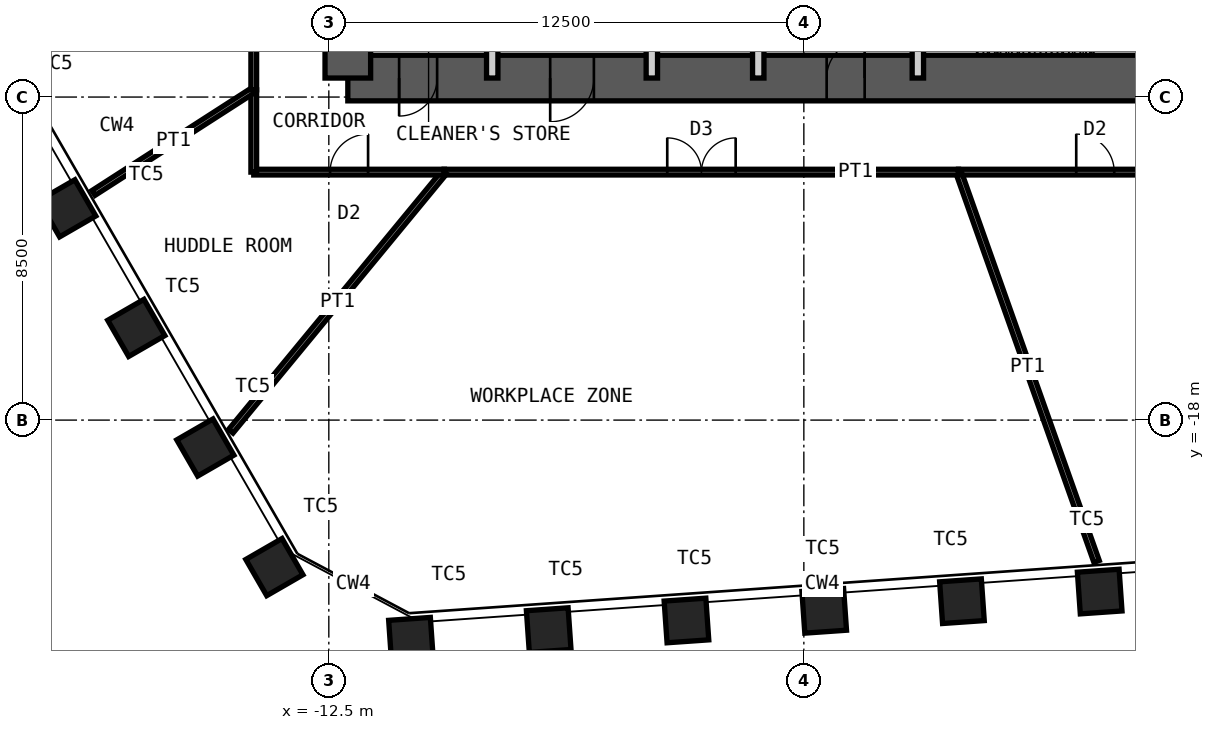
"""IFC4 building model, lengths in metres.
Left out: names, types, materials, properties, quantities, classifications, styles, units other than length and angle.
Written with IfcOpenShell. Run it as: python <this file> out.ifc"""

import sys

from ifc_helpers import new_model, si_unit, direction, frame, frame_2d, origin, origin_2d, place, context, subcontext, project, spatial, rectangle, hollow_rectangle, extrude, element, fill, save


model = new_model("IFC4")
c1 = context("Model", 3, precision=1e-05, world=origin(), true_north=direction((0.0, 1.0)))
c2 = subcontext(c1, "Body", "Model", "MODEL_VIEW")
j1 = project(units=[si_unit("LENGTHUNIT", "METRE"), si_unit("PLANEANGLEUNIT", "RADIAN")], contexts=[c1])
p1 = place(None, origin())
s1 = spatial("IfcSite", under=j1, at=p1, CompositionType="ELEMENT")
p2 = place(p1, origin())
s2 = spatial("IfcBuilding", under=s1, at=p2, CompositionType="ELEMENT")
p3 = place(p2, frame((0.0, 0.0, 184.6)))
s3 = spatial("IfcBuildingStorey", under=s2, at=p3, CompositionType="ELEMENT", Elevation=184.6)
for number, where, z_axis, x_axis in (
    (1, (7.785, -22.512, 0.0), (0.0, 0.0, 1.0), (0.998, 0.07, 0.0)),
    (2, (4.16, -22.765, 0.0), (0.0, 0.0, 1.0), (0.998, 0.07, 0.0)),
    (3, (0.536, -23.019, 0.0), (0.0, 0.0, 1.0), (0.998, 0.07, 0.0)),
    (4, (-3.089, -23.272, 0.0), (0.0, 0.0, 1.0), (0.998, 0.07, 0.0)),
    (5, (-6.714, -23.526, 0.0), (0.0, 0.0, 1.0), (0.998, 0.07, 0.0)),
    (6, (-10.338, -23.779, 0.0), (0.0, 0.0, 1.0), (0.998, 0.07, 0.0)),
    (7, (-13.933, -21.868, 0.0), (0.0, 0.0, 1.0), (0.5, -0.866, 0.0)),
    (8, (-15.749, -18.721, 0.0), (0.0, 0.0, 1.0), (0.5, -0.866, 0.0)),
    (9, (-17.566, -15.574, 0.0), (0.0, 0.0, 1.0), (0.5, -0.866, 0.0)),
    (10, (-19.383, -12.428, 0.0), (0.0, 0.0, 1.0), (0.5, -0.866, 0.0)),
):
    element("IfcColumn", number, at=place(p3, frame(where, z_axis=z_axis, x_axis=x_axis)), inside=s3, PredefinedType="COLUMN", context=c2, shape_type="SweptSolid", body=[
        extrude(hollow_rectangle(XDim=1.1, YDim=1.1, WallThickness=0.07, at=origin_2d()), origin(), (0.0, 0.0, 1.0), 4.2),
    ])
p4 = place(p3, frame((-12.0, -9.0, 0.0), z_axis=(0.0, 0.0, 1.0), x_axis=(1.0, 0.0, 0.0)))
e11 = element("IfcWall", 11, at=p4, inside=s3, PredefinedType="SHEAR", context=c2, shape_type="SweptSolid", body=[
    extrude(rectangle(XDim=24.0, YDim=1.2, at=frame_2d((12.0, 0.0))), origin(), (0.0, 0.0, 1.0), 4.2),
])
p5 = place(p4, frame((1.35, 0.0, 0.0)))
e12 = element("IfcOpeningElement", 12, at=p5, cuts=e11, PredefinedType="OPENING", context=c2, shape_type="SweptSolid", body=[
    extrude(rectangle(XDim=1.0, YDim=2.1, at=frame_2d((0.5, 1.05))), frame((0.0, 0.61, 0.0), z_axis=(0.0, -1.0, 0.0), x_axis=(1.0, 0.0, 0.0)), (0.0, 0.0, 1.0), 1.22),
])
p6 = place(p4, frame((5.325, 0.0, 0.0)))
e13 = element("IfcOpeningElement", 13, at=p6, cuts=e11, PredefinedType="OPENING", context=c2, shape_type="SweptSolid", body=[
    extrude(rectangle(XDim=1.15, YDim=2.1, at=frame_2d((0.575, 1.05))), frame((0.0, 0.61, 0.0), z_axis=(0.0, -1.0, 0.0), x_axis=(1.0, 0.0, 0.0)), (0.0, 0.0, 1.0), 1.22),
])
p7 = place(p4, frame((12.6, 0.0, 0.0)))
e14 = element("IfcOpeningElement", 14, at=p7, cuts=e11, PredefinedType="OPENING", context=c2, shape_type="SweptSolid", body=[
    extrude(rectangle(XDim=1.0, YDim=2.1, at=frame_2d((0.5, 1.05))), frame((0.0, 0.61, 0.0), z_axis=(0.0, -1.0, 0.0), x_axis=(1.0, 0.0, 0.0)), (0.0, 0.0, 1.0), 1.22),
])
p8 = place(p3, frame((-12.0, -9.0, 0.0), z_axis=(0.0, 0.0, 1.0), x_axis=(0.0, 1.0, 0.0)))
e15 = element("IfcWall", 15, at=p8, inside=s3, PredefinedType="SHEAR", context=c2, shape_type="SweptSolid", body=[
    extrude(rectangle(XDim=18.0, YDim=1.2, at=frame_2d((9.0, 0.0))), origin(), (0.0, 0.0, 1.0), 4.2),
])
p9 = place(p8, frame((8.1, 0.0, 0.0)))
e16 = element("IfcOpeningElement", 16, at=p9, cuts=e15, PredefinedType="OPENING", context=c2, shape_type="SweptSolid", body=[
    extrude(rectangle(XDim=1.8, YDim=2.1, at=frame_2d((0.9, 1.05))), frame((0.0, 0.61, 0.0), z_axis=(0.0, -1.0, 0.0), x_axis=(1.0, 0.0, 0.0)), (0.0, 0.0, 1.0), 1.22),
])
for number, where, z_axis, x_axis in (
    (17, (-8.2, -9.0, 0.0), (0.0, 0.0, 1.0), (0.0, 1.0, 0.0)),
    (18, (-4.0, -9.0, 0.0), (0.0, 0.0, 1.0), (0.0, 1.0, 0.0)),
):
    element("IfcWall", number, at=place(p3, frame(where, z_axis=z_axis, x_axis=x_axis)), inside=s3, PredefinedType="PARTITIONING", context=c2, shape_type="SweptSolid", body=[
        extrude(rectangle(XDim=3.85, YDim=0.3, at=frame_2d((1.925, 0.0))), origin(), (0.0, 0.0, 1.0), 3.98),
    ])
p10 = place(p3, frame((-1.2, -9.0, 0.0), z_axis=(0.0, 0.0, 1.0), x_axis=(0.0, 1.0, 0.0)))
e19 = element("IfcWall", 19, at=p10, inside=s3, PredefinedType="PARTITIONING", context=c2, shape_type="SweptSolid", body=[
    extrude(rectangle(XDim=3.85, YDim=0.3, at=frame_2d((1.925, 0.0))), origin(), (0.0, 0.0, 1.0), 3.98),
])
p11 = place(p10, frame((1.375, 0.0, 0.0)))
e20 = element("IfcOpeningElement", 20, at=p11, cuts=e19, PredefinedType="OPENING", context=c2, shape_type="SweptSolid", body=[
    extrude(rectangle(XDim=1.1, YDim=2.4, at=frame_2d((0.55, 1.2))), frame((0.0, 0.16, 0.0), z_axis=(0.0, -1.0, 0.0), x_axis=(1.0, 0.0, 0.0)), (0.0, 0.0, 1.0), 0.32),
])
p12 = place(p3, frame((3.0, -9.0, 0.0), z_axis=(0.0, 0.0, 1.0), x_axis=(0.0, 1.0, 0.0)))
e21 = element("IfcWall", 21, at=p12, inside=s3, PredefinedType="PARTITIONING", context=c2, shape_type="SweptSolid", body=[
    extrude(rectangle(XDim=3.85, YDim=0.3, at=frame_2d((1.925, 0.0))), origin(), (0.0, 0.0, 1.0), 3.98),
])
p13 = place(p12, frame((1.425, 0.0, 0.0)))
e22 = element("IfcOpeningElement", 22, at=p13, cuts=e21, PredefinedType="OPENING", context=c2, shape_type="SweptSolid", body=[
    extrude(rectangle(XDim=1.0, YDim=2.1, at=frame_2d((0.5, 1.05))), frame((0.0, 0.16, 0.0), z_axis=(0.0, -1.0, 0.0), x_axis=(1.0, 0.0, 0.0)), (0.0, 0.0, 1.0), 0.32),
])
p14 = place(p3, frame((11.266, -11.475, 0.0), z_axis=(0.0, 0.0, 1.0), x_axis=(-1.0, 0.0, 0.0)))
e23 = element("IfcWall", 23, at=p14, inside=s3, PredefinedType="PARTITIONING", context=c2, shape_type="SweptSolid", body=[
    extrude(rectangle(XDim=7.196, YDim=0.15, at=frame_2d((3.598, 0.0))), origin(), (0.0, 0.0, 1.0), 4.03),
])
p15 = place(p14, frame((3.098, 0.0, 0.0)))
e24 = element("IfcOpeningElement", 24, at=p15, cuts=e23, PredefinedType="OPENING", context=c2, shape_type="SweptSolid", body=[
    extrude(rectangle(XDim=1.0, YDim=2.4, at=frame_2d((0.5, 1.2))), frame((0.0, 0.085, 0.0), z_axis=(0.0, -1.0, 0.0), x_axis=(1.0, 0.0, 0.0)), (0.0, 0.0, 1.0), 0.17),
])
p16 = place(p3, frame((7.703, -21.719, 0.0), z_axis=(0.0, 0.0, 1.0), x_axis=(-0.334269551553, 0.942477515331, 0.0)))
e25 = element("IfcWall", 25, at=p16, inside=s3, PredefinedType="PARTITIONING", context=c2, shape_type="SweptSolid", body=[
    extrude(rectangle(XDim=10.869, YDim=0.15, at=frame_2d((5.435, 0.0))), origin(), (0.0, 0.0, 1.0), 3.43),
])
p17 = place(p3, frame((4.07, -11.475, 0.0), z_axis=(0.0, 0.0, 1.0), x_axis=(-1.0, 0.0, 0.0)))
e26 = element("IfcWall", 26, at=p17, inside=s3, PredefinedType="PARTITIONING", context=c2, shape_type="SweptSolid", body=[
    extrude(rectangle(XDim=13.528, YDim=0.15, at=frame_2d((6.764, 0.0))), origin(), (0.0, 0.0, 1.0), 4.03),
])
p18 = place(p17, frame((5.864, 0.0, 0.0)))
e27 = element("IfcOpeningElement", 27, at=p18, cuts=e26, PredefinedType="OPENING", context=c2, shape_type="SweptSolid", body=[
    extrude(rectangle(XDim=1.8, YDim=2.4, at=frame_2d((0.9, 1.2))), frame((0.0, 0.085, 0.0), z_axis=(0.0, -1.0, 0.0), x_axis=(1.0, 0.0, 0.0)), (0.0, 0.0, 1.0), 0.17),
])
p19 = place(p3, frame((-15.08, -18.294, 0.0), z_axis=(0.0, 0.0, 1.0), x_axis=(0.636052894953, 0.771645459277, 0.0)))
e28 = element("IfcWall", 28, at=p19, inside=s3, PredefinedType="PARTITIONING", context=c2, shape_type="SweptSolid", body=[
    extrude(rectangle(XDim=8.837, YDim=0.15, at=frame_2d((4.418, 0.0))), origin(), (0.0, 0.0, 1.0), 3.43),
])
p20 = place(p3, frame((-9.459, -11.475, 0.0), z_axis=(0.0, 0.0, 1.0), x_axis=(-1.0, 0.0, 0.0)))
e29 = element("IfcWall", 29, at=p20, inside=s3, PredefinedType="PARTITIONING", context=c2, shape_type="SweptSolid", body=[
    extrude(rectangle(XDim=5.016, YDim=0.15, at=frame_2d((2.508, 0.0))), origin(), (0.0, 0.0, 1.0), 4.03),
])
p21 = place(p20, frame((2.008, 0.0, 0.0)))
e30 = element("IfcOpeningElement", 30, at=p21, cuts=e29, PredefinedType="OPENING", context=c2, shape_type="SweptSolid", body=[
    extrude(rectangle(XDim=1.0, YDim=2.4, at=frame_2d((0.5, 1.2))), frame((0.0, 0.085, 0.0), z_axis=(0.0, -1.0, 0.0), x_axis=(1.0, 0.0, 0.0)), (0.0, 0.0, 1.0), 0.17),
])
p22 = place(p3, frame((-14.475, -11.475, 0.0), z_axis=(0.0, 0.0, 1.0), x_axis=(0.0, 1.0, 0.0)))
e31 = element("IfcWall", 31, at=p22, inside=s3, PredefinedType="PARTITIONING", context=c2, shape_type="SweptSolid", body=[
    extrude(rectangle(XDim=2.164, YDim=0.15, at=frame_2d((1.082, 0.0))), origin(), (0.0, 0.0, 1.0), 4.03),
])
p23 = place(p3, frame((-18.693, -12.024, 0.0), z_axis=(0.0, 0.0, 1.0), x_axis=(0.841031335058, 0.540986407824, 0.0)))
e32 = element("IfcWall", 32, at=p23, inside=s3, PredefinedType="PARTITIONING", context=c2, shape_type="SweptSolid", body=[
    extrude(rectangle(XDim=5.015, YDim=0.15, at=frame_2d((2.507, 0.0))), origin(), (0.0, 0.0, 1.0), 3.43),
])
p24 = place(p3, frame((-14.475, -9.311, 0.0), z_axis=(0.0, 0.0, 1.0), x_axis=(0.0, 1.0, 0.0)))
e33 = element("IfcWall", 33, at=p24, inside=s3, PredefinedType="PARTITIONING", context=c2, shape_type="SweptSolid", body=[
    extrude(rectangle(XDim=11.987, YDim=0.15, at=frame_2d((5.993, 0.0))), origin(), (0.0, 0.0, 1.0), 4.03),
])
p25 = place(p24, frame((5.093, 0.0, 0.0)))
e34 = element("IfcOpeningElement", 34, at=p25, cuts=e33, PredefinedType="OPENING", context=c2, shape_type="SweptSolid", body=[
    extrude(rectangle(XDim=1.8, YDim=2.4, at=frame_2d((0.9, 1.2))), frame((0.0, 0.085, 0.0), z_axis=(0.0, -1.0, 0.0), x_axis=(1.0, 0.0, 0.0)), (0.0, 0.0, 1.0), 0.17),
])
p26 = place(p5, origin())
e35 = element("IfcDoor", 35, at=p26, inside=s3, OperationType="SINGLE_SWING_LEFT", PredefinedType="DOOR", context=c2, shape_type="SweptSolid", body=[
    extrude(rectangle(XDim=1.0, YDim=2.1, at=frame_2d((0.5, 1.05))), frame((0.0, 0.025, 0.0), z_axis=(0.0, -1.0, 0.0), x_axis=(1.0, 0.0, 0.0)), (0.0, 0.0, 1.0), 0.05),
])
fill(e12, e35)
p27 = place(p6, origin())
e36 = element("IfcDoor", 36, at=p27, inside=s3, OperationType="SINGLE_SWING_LEFT", PredefinedType="DOOR", context=c2, shape_type="SweptSolid", body=[
    extrude(rectangle(XDim=1.15, YDim=2.1, at=frame_2d((0.575, 1.05))), frame((0.0, 0.025, 0.0), z_axis=(0.0, -1.0, 0.0), x_axis=(1.0, 0.0, 0.0)), (0.0, 0.0, 1.0), 0.05),
])
fill(e13, e36)
p28 = place(p7, origin())
e37 = element("IfcDoor", 37, at=p28, inside=s3, OperationType="SINGLE_SWING_LEFT", PredefinedType="DOOR", context=c2, shape_type="SweptSolid", body=[
    extrude(rectangle(XDim=1.0, YDim=2.1, at=frame_2d((0.5, 1.05))), frame((0.0, 0.025, 0.0), z_axis=(0.0, -1.0, 0.0), x_axis=(1.0, 0.0, 0.0)), (0.0, 0.0, 1.0), 0.05),
])
fill(e14, e37)
p29 = place(p15, origin())
e38 = element("IfcDoor", 38, at=p29, inside=s3, OperationType="SINGLE_SWING_RIGHT", PredefinedType="DOOR", context=c2, shape_type="SweptSolid", body=[
    extrude(rectangle(XDim=1.0, YDim=2.4, at=frame_2d((0.5, 1.2))), frame((0.0, 0.025, 0.0), z_axis=(0.0, -1.0, 0.0), x_axis=(1.0, 0.0, 0.0)), (0.0, 0.0, 1.0), 0.05),
])
fill(e24, e38)
p30 = place(p18, origin())
e39 = element("IfcDoor", 39, at=p30, inside=s3, OperationType="DOUBLE_DOOR_DOUBLE_SWING", PredefinedType="DOOR", context=c2, shape_type="SweptSolid", body=[
    extrude(rectangle(XDim=1.8, YDim=2.4, at=frame_2d((0.9, 1.2))), frame((0.0, 0.025, 0.0), z_axis=(0.0, -1.0, 0.0), x_axis=(1.0, 0.0, 0.0)), (0.0, 0.0, 1.0), 0.05),
])
fill(e27, e39)
p31 = place(p21, origin())
e40 = element("IfcDoor", 40, at=p31, inside=s3, OperationType="SINGLE_SWING_LEFT", PredefinedType="DOOR", context=c2, shape_type="SweptSolid", body=[
    extrude(rectangle(XDim=1.0, YDim=2.4, at=frame_2d((0.5, 1.2))), frame((0.0, 0.025, 0.0), z_axis=(0.0, -1.0, 0.0), x_axis=(1.0, 0.0, 0.0)), (0.0, 0.0, 1.0), 0.05),
])
fill(e30, e40)
save(model, sys.argv[1])
